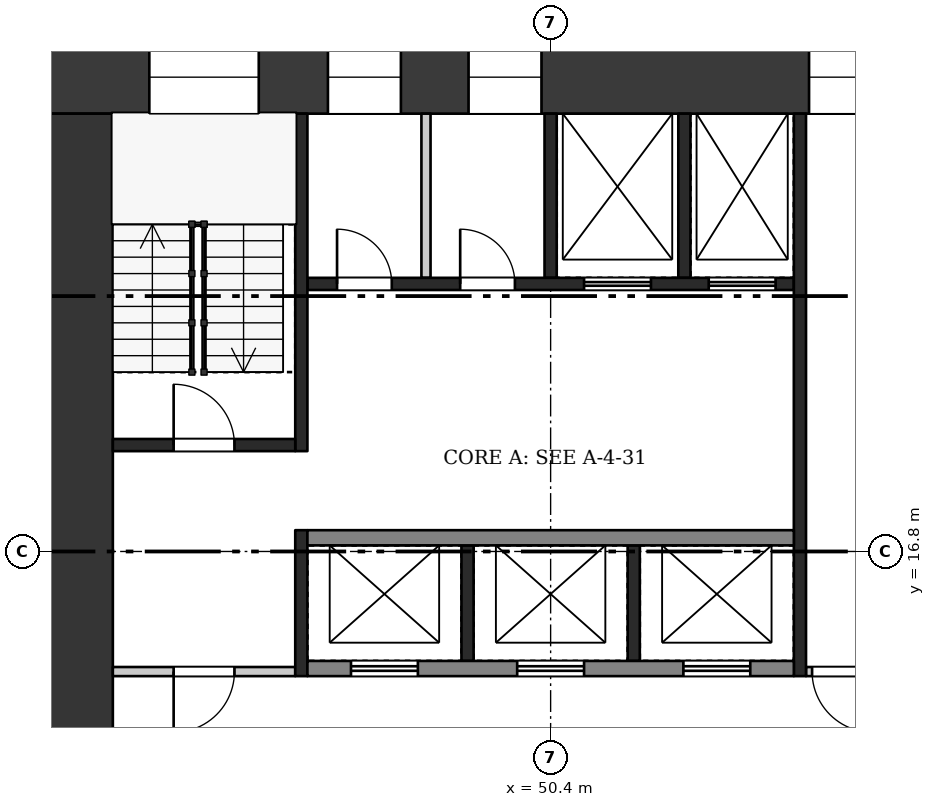
"""IFC4 building model, lengths in metres.
Left out: names, types, materials, properties, quantities, classifications, styles, units other than length and angle.
Written with IfcOpenShell. Run it as: python <this file> out.ifc"""

import sys

from ifc_helpers import new_model, si_unit, direction, frame, frame_2d, origin, place, context, subcontext, project, spatial, rectangle, extrude, element, fill, save


model = new_model("IFC4")
c1 = context("Model", 3, precision=1e-05, world=origin(), true_north=direction((0.0, 1.0)))
c2 = subcontext(c1, "Body", "Model", "MODEL_VIEW")
j1 = project(units=[si_unit("LENGTHUNIT", "METRE"), si_unit("PLANEANGLEUNIT", "RADIAN")], contexts=[c1])
p1 = place(None, origin())
s1 = spatial("IfcSite", under=j1, at=p1, CompositionType="ELEMENT")
p2 = place(p1, origin())
s2 = spatial("IfcBuilding", under=s1, at=p2, CompositionType="ELEMENT")
p3 = place(p2, frame((0.0, 0.0, 224.7)))
s3 = spatial("IfcBuildingStorey", under=s2, at=p3, CompositionType="ELEMENT", Elevation=224.7)
p4 = place(p3, frame((42.0, 24.6, 0.0), z_axis=(0.0, 0.0, 1.0), x_axis=(1.0, 0.0, 0.0)))
e1 = element("IfcWall", 1, at=p4, inside=s3, PredefinedType="SHEAR", context=c2, shape_type="SweptSolid", body=[
    extrude(rectangle(XDim=16.8, YDim=1.2, at=frame_2d((8.4, 0.0))), origin(), (0.0, 0.0, 1.0), 3.22),
])
p5 = place(p4, frame((1.8, 0.0, 0.5)))
e2 = element("IfcOpeningElement", 2, at=p5, cuts=e1, PredefinedType="OPENING", context=c2, shape_type="SweptSolid", body=[
    extrude(rectangle(XDim=1.8, YDim=2.4, at=frame_2d((0.9, 1.2))), frame((0.0, 0.61, 0.0), z_axis=(0.0, -1.0, 0.0), x_axis=(1.0, 0.0, 0.0)), (0.0, 0.0, 1.0), 1.22),
])
p6 = place(p4, frame((4.738, 0.0, 1.6)))
e3 = element("IfcOpeningElement", 3, at=p6, cuts=e1, PredefinedType="OPENING", context=c2, shape_type="SweptSolid", body=[
    extrude(rectangle(XDim=1.2, YDim=1.2, at=frame_2d((0.6, 0.6))), frame((0.0, 0.61, 0.0), z_axis=(0.0, -1.0, 0.0), x_axis=(1.0, 0.0, 0.0)), (0.0, 0.0, 1.0), 1.22),
])
p7 = place(p4, frame((7.05, 0.0, 1.6)))
e4 = element("IfcOpeningElement", 4, at=p7, cuts=e1, PredefinedType="OPENING", context=c2, shape_type="SweptSolid", body=[
    extrude(rectangle(XDim=1.2, YDim=1.2, at=frame_2d((0.6, 0.6))), frame((0.0, 0.61, 0.0), z_axis=(0.0, -1.0, 0.0), x_axis=(1.0, 0.0, 0.0)), (0.0, 0.0, 1.0), 1.22),
])
p8 = place(p4, frame((12.65, 0.0, 0.6)))
e5 = element("IfcOpeningElement", 5, at=p8, cuts=e1, PredefinedType="OPENING", context=c2, shape_type="SweptSolid", body=[
    extrude(rectangle(XDim=1.0, YDim=2.1, at=frame_2d((0.5, 1.05))), frame((0.0, 0.61, 0.0), z_axis=(0.0, -1.0, 0.0), x_axis=(1.0, 0.0, 0.0)), (0.0, 0.0, 1.0), 1.22),
])
p9 = place(p4, frame((14.175, 0.0, 1.6)))
e6 = element("IfcOpeningElement", 6, at=p9, cuts=e1, PredefinedType="OPENING", context=c2, shape_type="SweptSolid", body=[
    extrude(rectangle(XDim=1.2, YDim=1.2, at=frame_2d((0.6, 0.6))), frame((0.0, 0.61, 0.0), z_axis=(0.0, -1.0, 0.0), x_axis=(1.0, 0.0, 0.0)), (0.0, 0.0, 1.0), 1.22),
])
p10 = place(p3, frame((42.6, 9.6, 0.0), z_axis=(0.0, 0.0, 1.0), x_axis=(0.0, 1.0, 0.0)))
e7 = element("IfcWall", 7, at=p10, inside=s3, PredefinedType="SHEAR", context=c2, shape_type="SweptSolid", body=[
    extrude(rectangle(XDim=14.4, YDim=1.2, at=frame_2d((7.2, 0.0))), origin(), (0.0, 0.0, 1.0), 3.22),
])
p11 = place(p10, frame((2.1, 0.0, 0.0)))
e8 = element("IfcOpeningElement", 8, at=p11, cuts=e7, PredefinedType="OPENING", context=c2, shape_type="SweptSolid", body=[
    extrude(rectangle(XDim=1.8, YDim=2.1, at=frame_2d((0.9, 1.05))), frame((0.0, 0.61, 0.0), z_axis=(0.0, -1.0, 0.0), x_axis=(1.0, 0.0, 0.0)), (0.0, 0.0, 1.0), 1.22),
])
for number, where, z_axis, x_axis in (
    (9, (49.033, 15.0, 0.0), (0.0, 0.0, 1.0), (0.0, 1.0, 0.0)),
    (10, (51.767, 15.0, 0.0), (0.0, 0.0, 1.0), (0.0, 1.0, 0.0)),
):
    element("IfcWall", number, at=place(p3, frame(where, z_axis=z_axis, x_axis=x_axis)), inside=s3, PredefinedType="SHEAR", context=c2, shape_type="SweptSolid", body=[
        extrude(rectangle(XDim=1.9, YDim=0.2, at=frame_2d((0.95, 0.0))), origin(), (0.0, 0.0, 1.0), 3.22),
    ])
p12 = place(p3, frame((46.4, 14.875, 0.0), z_axis=(0.0, 0.0, 1.0), x_axis=(1.0, 0.0, 0.0)))
e11 = element("IfcWall", 11, at=p12, inside=s3, PredefinedType="SHEAR", context=c2, shape_type="SweptSolid", body=[
    extrude(rectangle(XDim=8.0, YDim=0.25, at=frame_2d((4.0, 0.0))), origin(), (0.0, 0.0, 1.0), 3.22),
])
p13 = place(p12, frame((0.717, 0.0, 0.0)))
e12 = element("IfcOpeningElement", 12, at=p13, cuts=e11, PredefinedType="OPENING", context=c2, shape_type="SweptSolid", body=[
    extrude(rectangle(XDim=1.1, YDim=2.1, at=frame_2d((0.55, 1.05))), frame((0.0, 0.135, 0.0), z_axis=(0.0, -1.0, 0.0), x_axis=(1.0, 0.0, 0.0)), (0.0, 0.0, 1.0), 0.27),
])
p14 = place(p12, frame((3.45, 0.0, 0.0)))
e13 = element("IfcOpeningElement", 13, at=p14, cuts=e11, PredefinedType="OPENING", context=c2, shape_type="SweptSolid", body=[
    extrude(rectangle(XDim=1.1, YDim=2.1, at=frame_2d((0.55, 1.05))), frame((0.0, 0.135, 0.0), z_axis=(0.0, -1.0, 0.0), x_axis=(1.0, 0.0, 0.0)), (0.0, 0.0, 1.0), 0.27),
])
p15 = place(p12, frame((6.183, 0.0, 0.0)))
e14 = element("IfcOpeningElement", 14, at=p15, cuts=e11, PredefinedType="OPENING", context=c2, shape_type="SweptSolid", body=[
    extrude(rectangle(XDim=1.1, YDim=2.1, at=frame_2d((0.55, 1.05))), frame((0.0, 0.135, 0.0), z_axis=(0.0, -1.0, 0.0), x_axis=(1.0, 0.0, 0.0)), (0.0, 0.0, 1.0), 0.27),
])
p16 = place(p3, frame((46.4, 17.025, 0.0), z_axis=(0.0, 0.0, 1.0), x_axis=(1.0, 0.0, 0.0)))
e15 = element("IfcWall", 15, at=p16, inside=s3, PredefinedType="SHEAR", context=c2, shape_type="SweptSolid", body=[
    extrude(rectangle(XDim=8.0, YDim=0.25, at=frame_2d((4.0, 0.0))), origin(), (0.0, 0.0, 1.0), 3.22),
])
for number, where, z_axis, x_axis in (
    (16, (50.4, 21.3, 0.0), (0.0, 0.0, 1.0), (0.0, 1.0, 0.0)),
    (17, (52.6, 21.3, 0.0), (0.0, 0.0, 1.0), (0.0, 1.0, 0.0)),
):
    element("IfcWall", number, at=place(p3, frame(where, z_axis=z_axis, x_axis=x_axis)), inside=s3, PredefinedType="SHEAR", context=c2, shape_type="SweptSolid", body=[
        extrude(rectangle(XDim=2.7, YDim=0.2, at=frame_2d((1.35, 0.0))), origin(), (0.0, 0.0, 1.0), 3.22),
    ])
p17 = place(p3, frame((48.35, 21.3, 0.0), z_axis=(0.0, 0.0, 1.0), x_axis=(0.0, 1.0, 0.0)))
e18 = element("IfcWall", 18, at=p17, inside=s3, PredefinedType="PARTITIONING", context=c2, shape_type="SweptSolid", body=[
    extrude(rectangle(XDim=2.7, YDim=0.15, at=frame_2d((1.35, 0.0))), origin(), (0.0, 0.0, 1.0), 3.22),
])
p18 = place(p3, frame((46.4, 21.2, 0.0), z_axis=(0.0, 0.0, 1.0), x_axis=(1.0, 0.0, 0.0)))
e19 = element("IfcWall", 19, at=p18, inside=s3, PredefinedType="SHEAR", context=c2, shape_type="SweptSolid", body=[
    extrude(rectangle(XDim=8.0, YDim=0.2, at=frame_2d((4.0, 0.0))), origin(), (0.0, 0.0, 1.0), 3.22),
])
p19 = place(p18, frame((0.488, 0.0, 0.0)))
e20 = element("IfcOpeningElement", 20, at=p19, cuts=e19, PredefinedType="OPENING", context=c2, shape_type="SweptSolid", body=[
    extrude(rectangle(XDim=0.9, YDim=2.1, at=frame_2d((0.45, 1.05))), frame((0.0, 0.11, 0.0), z_axis=(0.0, -1.0, 0.0), x_axis=(1.0, 0.0, 0.0)), (0.0, 0.0, 1.0), 0.22),
])
p20 = place(p18, frame((2.512, 0.0, 0.0)))
e21 = element("IfcOpeningElement", 21, at=p20, cuts=e19, PredefinedType="OPENING", context=c2, shape_type="SweptSolid", body=[
    extrude(rectangle(XDim=0.9, YDim=2.1, at=frame_2d((0.45, 1.05))), frame((0.0, 0.11, 0.0), z_axis=(0.0, -1.0, 0.0), x_axis=(1.0, 0.0, 0.0)), (0.0, 0.0, 1.0), 0.22),
])
p21 = place(p18, frame((4.55, 0.0, 0.0)))
e22 = element("IfcOpeningElement", 22, at=p21, cuts=e19, PredefinedType="OPENING", context=c2, shape_type="SweptSolid", body=[
    extrude(rectangle(XDim=1.1, YDim=2.1, at=frame_2d((0.55, 1.05))), frame((0.0, 0.11, 0.0), z_axis=(0.0, -1.0, 0.0), x_axis=(1.0, 0.0, 0.0)), (0.0, 0.0, 1.0), 0.22),
])
p22 = place(p18, frame((6.6, 0.0, 0.0)))
e23 = element("IfcOpeningElement", 23, at=p22, cuts=e19, PredefinedType="OPENING", context=c2, shape_type="SweptSolid", body=[
    extrude(rectangle(XDim=1.1, YDim=2.1, at=frame_2d((0.55, 1.05))), frame((0.0, 0.11, 0.0), z_axis=(0.0, -1.0, 0.0), x_axis=(1.0, 0.0, 0.0)), (0.0, 0.0, 1.0), 0.22),
])
p23 = place(p3, frame((46.3, 14.75, 0.0), z_axis=(0.0, 0.0, 1.0), x_axis=(0.0, 1.0, 0.0)))
e24 = element("IfcWall", 24, at=p23, inside=s3, PredefinedType="SHEAR", context=c2, shape_type="SweptSolid", body=[
    extrude(rectangle(XDim=2.4, YDim=0.2, at=frame_2d((1.2, 0.0))), origin(), (0.0, 0.0, 1.0), 3.22),
])
p24 = place(p3, frame((46.3, 18.45, 0.0), z_axis=(0.0, 0.0, 1.0), x_axis=(0.0, 1.0, 0.0)))
e25 = element("IfcWall", 25, at=p24, inside=s3, PredefinedType="SHEAR", context=c2, shape_type="SweptSolid", body=[
    extrude(rectangle(XDim=5.55, YDim=0.2, at=frame_2d((2.775, 0.0))), origin(), (0.0, 0.0, 1.0), 3.22),
])
p25 = place(p3, frame((43.2, 14.825, 0.0), z_axis=(0.0, 0.0, 1.0), x_axis=(1.0, 0.0, 0.0)))
e26 = element("IfcWall", 26, at=p25, inside=s3, PredefinedType="PARTITIONING", context=c2, shape_type="SweptSolid", body=[
    extrude(rectangle(XDim=3.0, YDim=0.15, at=frame_2d((1.5, 0.0))), origin(), (0.0, 0.0, 1.0), 3.22),
])
p26 = place(p25, frame((1.0, 0.0, 0.0)))
e27 = element("IfcOpeningElement", 27, at=p26, cuts=e26, PredefinedType="OPENING", context=c2, shape_type="SweptSolid", body=[
    extrude(rectangle(XDim=1.0, YDim=2.1, at=frame_2d((0.5, 1.05))), frame((0.0, 0.085, 0.0), z_axis=(0.0, -1.0, 0.0), x_axis=(1.0, 0.0, 0.0)), (0.0, 0.0, 1.0), 0.17),
])
p27 = place(p3, frame((43.2, 18.55, 0.0), z_axis=(0.0, 0.0, 1.0), x_axis=(1.0, 0.0, 0.0)))
e28 = element("IfcWall", 28, at=p27, inside=s3, PredefinedType="SHEAR", context=c2, shape_type="SweptSolid", body=[
    extrude(rectangle(XDim=3.0, YDim=0.2, at=frame_2d((1.5, 0.0))), origin(), (0.0, 0.0, 1.0), 3.22),
])
p28 = place(p27, frame((1.0, 0.0, 0.0)))
e29 = element("IfcOpeningElement", 29, at=p28, cuts=e28, PredefinedType="OPENING", context=c2, shape_type="SweptSolid", body=[
    extrude(rectangle(XDim=1.0, YDim=2.1, at=frame_2d((0.5, 1.05))), frame((0.0, 0.11, 0.0), z_axis=(0.0, -1.0, 0.0), x_axis=(1.0, 0.0, 0.0)), (0.0, 0.0, 1.0), 0.22),
])
p29 = place(p3, frame((54.5, 14.75, 0.0), z_axis=(0.0, 0.0, 1.0), x_axis=(0.0, 1.0, 0.0)))
e30 = element("IfcWall", 30, at=p29, inside=s3, PredefinedType="SHEAR", context=c2, shape_type="SweptSolid", body=[
    extrude(rectangle(XDim=9.25, YDim=0.2, at=frame_2d((4.625, 0.0))), origin(), (0.0, 0.0, 1.0), 3.22),
])
p30 = place(p3, frame((54.6, 14.825, 0.0), z_axis=(0.0, 0.0, 1.0), x_axis=(1.0, 0.0, 0.0)))
e31 = element("IfcWall", 31, at=p30, inside=s3, PredefinedType="PARTITIONING", context=c2, shape_type="SweptSolid", body=[
    extrude(rectangle(XDim=3.0, YDim=0.15, at=frame_2d((1.5, 0.0))), origin(), (0.0, 0.0, 1.0), 3.22),
])
p31 = place(p30, frame((0.1, 0.0, 0.0)))
e32 = element("IfcOpeningElement", 32, at=p31, cuts=e31, PredefinedType="OPENING", context=c2, shape_type="SweptSolid", body=[
    extrude(rectangle(XDim=1.0, YDim=2.1, at=frame_2d((0.5, 1.05))), frame((0.0, 0.085, 0.0), z_axis=(0.0, -1.0, 0.0), x_axis=(1.0, 0.0, 0.0)), (0.0, 0.0, 1.0), 0.17),
])
p32 = place(p13, origin())
e33 = element("IfcDoor", 33, at=p32, inside=s3, OperationType="DOUBLE_DOOR_SLIDING", PredefinedType="DOOR", context=c2, shape_type="SweptSolid", body=[
    extrude(rectangle(XDim=1.1, YDim=2.1, at=frame_2d((0.55, 1.05))), frame((0.0, 0.025, 0.0), z_axis=(0.0, -1.0, 0.0), x_axis=(1.0, 0.0, 0.0)), (0.0, 0.0, 1.0), 0.05),
])
fill(e12, e33)
p33 = place(p14, origin())
e34 = element("IfcDoor", 34, at=p33, inside=s3, OperationType="DOUBLE_DOOR_SLIDING", PredefinedType="DOOR", context=c2, shape_type="SweptSolid", body=[
    extrude(rectangle(XDim=1.1, YDim=2.1, at=frame_2d((0.55, 1.05))), frame((0.0, 0.025, 0.0), z_axis=(0.0, -1.0, 0.0), x_axis=(1.0, 0.0, 0.0)), (0.0, 0.0, 1.0), 0.05),
])
fill(e13, e34)
p34 = place(p15, origin())
e35 = element("IfcDoor", 35, at=p34, inside=s3, OperationType="DOUBLE_DOOR_SLIDING", PredefinedType="DOOR", context=c2, shape_type="SweptSolid", body=[
    extrude(rectangle(XDim=1.1, YDim=2.1, at=frame_2d((0.55, 1.05))), frame((0.0, 0.025, 0.0), z_axis=(0.0, -1.0, 0.0), x_axis=(1.0, 0.0, 0.0)), (0.0, 0.0, 1.0), 0.05),
])
fill(e14, e35)
p35 = place(p19, origin())
e36 = element("IfcDoor", 36, at=p35, inside=s3, OperationType="SINGLE_SWING_LEFT", PredefinedType="DOOR", context=c2, shape_type="SweptSolid", body=[
    extrude(rectangle(XDim=0.9, YDim=2.1, at=frame_2d((0.45, 1.05))), frame((0.0, 0.025, 0.0), z_axis=(0.0, -1.0, 0.0), x_axis=(1.0, 0.0, 0.0)), (0.0, 0.0, 1.0), 0.05),
])
fill(e20, e36)
p36 = place(p20, origin())
e37 = element("IfcDoor", 37, at=p36, inside=s3, OperationType="SINGLE_SWING_LEFT", PredefinedType="DOOR", context=c2, shape_type="SweptSolid", body=[
    extrude(rectangle(XDim=0.9, YDim=2.1, at=frame_2d((0.45, 1.05))), frame((0.0, 0.025, 0.0), z_axis=(0.0, -1.0, 0.0), x_axis=(1.0, 0.0, 0.0)), (0.0, 0.0, 1.0), 0.05),
])
fill(e21, e37)
p37 = place(p21, origin())
e38 = element("IfcDoor", 38, at=p37, inside=s3, OperationType="DOUBLE_DOOR_SLIDING", PredefinedType="DOOR", context=c2, shape_type="SweptSolid", body=[
    extrude(rectangle(XDim=1.1, YDim=2.1, at=frame_2d((0.55, 1.05))), frame((0.0, 0.025, 0.0), z_axis=(0.0, -1.0, 0.0), x_axis=(1.0, 0.0, 0.0)), (0.0, 0.0, 1.0), 0.05),
])
fill(e22, e38)
p38 = place(p22, origin())
e39 = element("IfcDoor", 39, at=p38, inside=s3, OperationType="DOUBLE_DOOR_SLIDING", PredefinedType="DOOR", context=c2, shape_type="SweptSolid", body=[
    extrude(rectangle(XDim=1.1, YDim=2.1, at=frame_2d((0.55, 1.05))), frame((0.0, 0.025, 0.0), z_axis=(0.0, -1.0, 0.0), x_axis=(1.0, 0.0, 0.0)), (0.0, 0.0, 1.0), 0.05),
])
fill(e23, e39)
p39 = place(p26, frame((1.0, 0.0, 0.0), z_axis=(0.0, 0.0, 1.0), x_axis=(-1.0, 0.0, 0.0)))
e40 = element("IfcDoor", 40, at=p39, inside=s3, OperationType="SINGLE_SWING_RIGHT", PredefinedType="DOOR", context=c2, shape_type="SweptSolid", body=[
    extrude(rectangle(XDim=1.0, YDim=2.1, at=frame_2d((0.5, 1.05))), frame((0.0, 0.025, 0.0), z_axis=(0.0, -1.0, 0.0), x_axis=(1.0, 0.0, 0.0)), (0.0, 0.0, 1.0), 0.05),
])
fill(e27, e40)
p40 = place(p28, origin())
e41 = element("IfcDoor", 41, at=p40, inside=s3, OperationType="SINGLE_SWING_LEFT", PredefinedType="DOOR", context=c2, shape_type="SweptSolid", body=[
    extrude(rectangle(XDim=1.0, YDim=2.1, at=frame_2d((0.5, 1.05))), frame((0.0, 0.025, 0.0), z_axis=(0.0, -1.0, 0.0), x_axis=(1.0, 0.0, 0.0)), (0.0, 0.0, 1.0), 0.05),
])
fill(e29, e41)
p41 = place(p31, frame((1.0, 0.0, 0.0), z_axis=(0.0, 0.0, 1.0), x_axis=(-1.0, 0.0, 0.0)))
e42 = element("IfcDoor", 42, at=p41, inside=s3, OperationType="SINGLE_SWING_LEFT", PredefinedType="DOOR", context=c2, shape_type="SweptSolid", body=[
    extrude(rectangle(XDim=1.0, YDim=2.1, at=frame_2d((0.5, 1.05))), frame((0.0, 0.025, 0.0), z_axis=(0.0, -1.0, 0.0), x_axis=(1.0, 0.0, 0.0)), (0.0, 0.0, 1.0), 0.05),
])
fill(e32, e42)
p42 = place(p5, origin())
e43 = element("IfcWindow", 43, at=p42, inside=s3, PartitioningType="SINGLE_PANEL", PredefinedType="WINDOW", context=c2, shape_type="SweptSolid", body=[
    extrude(rectangle(XDim=1.8, YDim=2.4, at=frame_2d((0.9, 1.2))), frame((0.0, 0.03, 0.0), z_axis=(0.0, -1.0, 0.0), x_axis=(1.0, 0.0, 0.0)), (0.0, 0.0, 1.0), 0.06),
])
fill(e2, e43)
p43 = place(p6, origin())
e44 = element("IfcWindow", 44, at=p43, inside=s3, PartitioningType="SINGLE_PANEL", PredefinedType="WINDOW", context=c2, shape_type="SweptSolid", body=[
    extrude(rectangle(XDim=1.2, YDim=1.2, at=frame_2d((0.6, 0.6))), frame((0.0, 0.03, 0.0), z_axis=(0.0, -1.0, 0.0), x_axis=(1.0, 0.0, 0.0)), (0.0, 0.0, 1.0), 0.06),
])
fill(e3, e44)
p44 = place(p7, origin())
e45 = element("IfcWindow", 45, at=p44, inside=s3, PartitioningType="SINGLE_PANEL", PredefinedType="WINDOW", context=c2, shape_type="SweptSolid", body=[
    extrude(rectangle(XDim=1.2, YDim=1.2, at=frame_2d((0.6, 0.6))), frame((0.0, 0.03, 0.0), z_axis=(0.0, -1.0, 0.0), x_axis=(1.0, 0.0, 0.0)), (0.0, 0.0, 1.0), 0.06),
])
fill(e4, e45)
p45 = place(p8, origin())
e46 = element("IfcWindow", 46, at=p45, inside=s3, PartitioningType="SINGLE_PANEL", PredefinedType="WINDOW", context=c2, shape_type="SweptSolid", body=[
    extrude(rectangle(XDim=1.0, YDim=2.1, at=frame_2d((0.5, 1.05))), frame((0.0, 0.03, 0.0), z_axis=(0.0, -1.0, 0.0), x_axis=(1.0, 0.0, 0.0)), (0.0, 0.0, 1.0), 0.06),
])
fill(e5, e46)
save(model, sys.argv[1])
